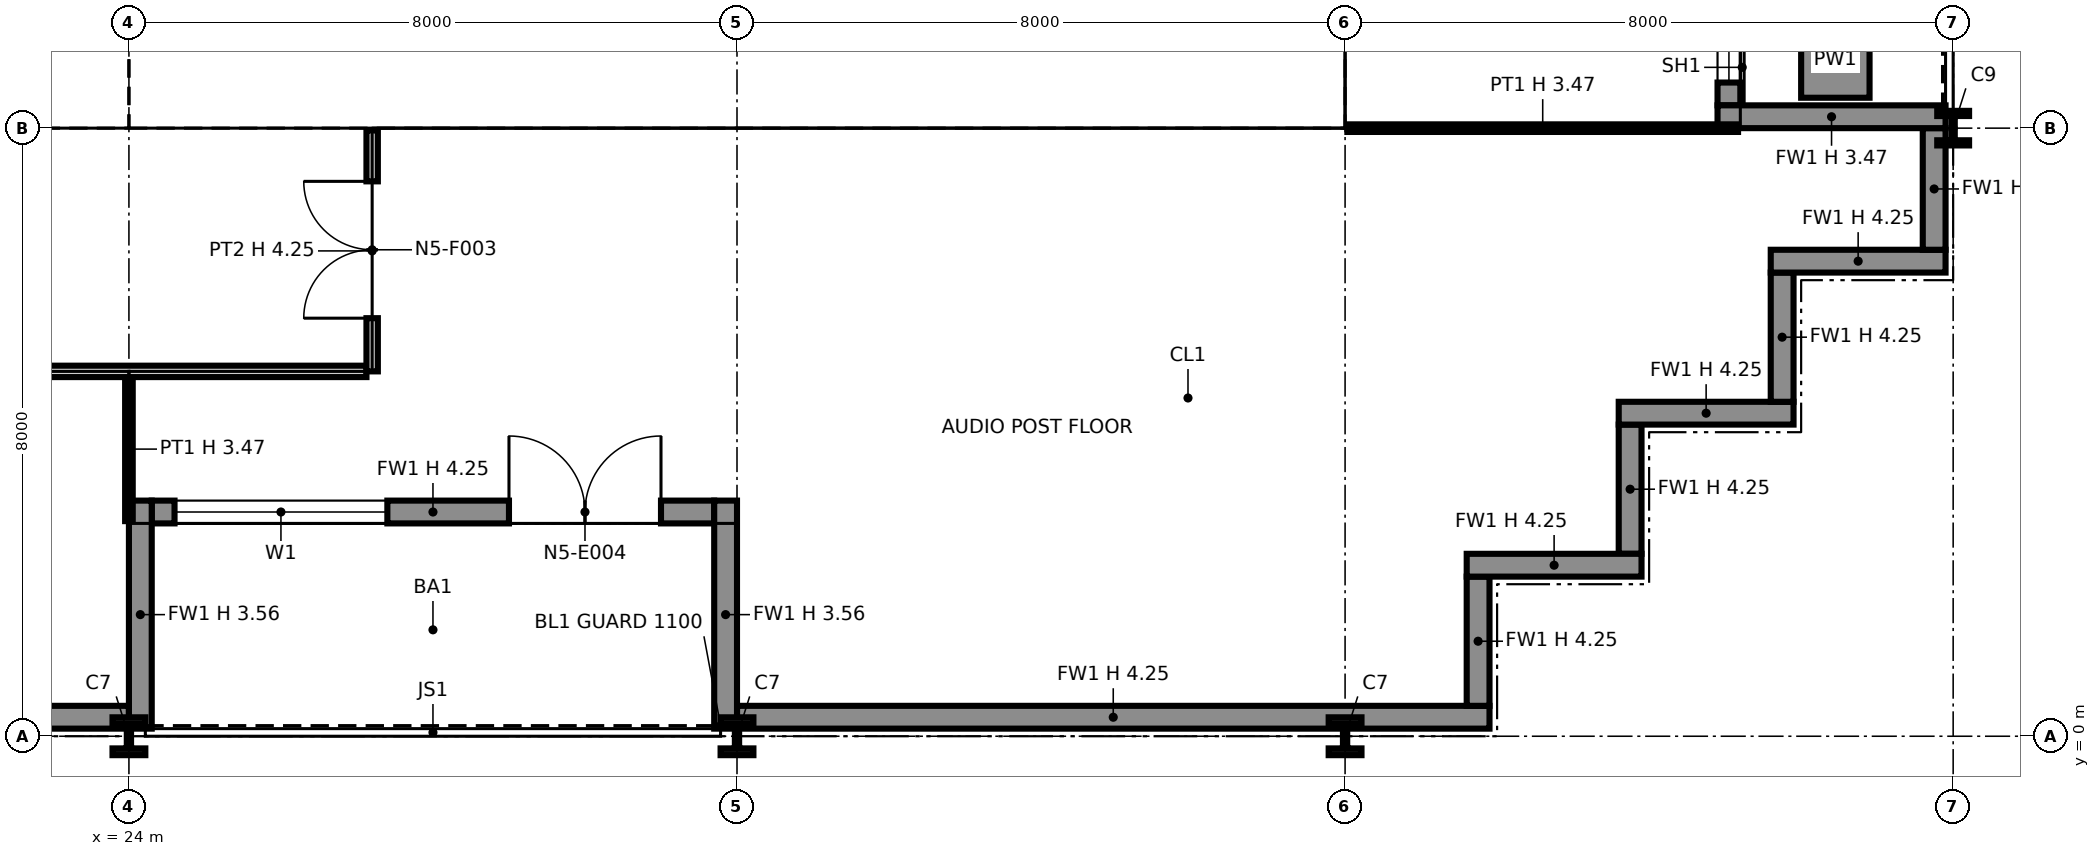
"""IFC4 building model, lengths in metres.
Left out: names, types, materials, properties, quantities, classifications, styles, units other than length and angle.
Written with IfcOpenShell. Run it as: python <this file> out.ifc"""

import sys

from ifc_helpers import new_model, si_unit, direction, frame, frame_2d, origin, origin_2d, place, context, subcontext, project, spatial, polyline, rectangle, i_section, outline, extrude, element, fill, save


model = new_model("IFC4")
c1 = context("Model", 3, precision=1e-05, world=origin(), true_north=direction((0.0, 1.0)))
c2 = subcontext(c1, "Body", "Model", "MODEL_VIEW")
j1 = project(units=[si_unit("LENGTHUNIT", "METRE"), si_unit("PLANEANGLEUNIT", "RADIAN")], contexts=[c1])
p1 = place(None, origin())
s1 = spatial("IfcSite", under=j1, at=p1, CompositionType="ELEMENT")
p2 = place(p1, origin())
s2 = spatial("IfcBuilding", under=s1, at=p2, CompositionType="ELEMENT")
p3 = place(p2, frame((0.0, 0.0, 87.6)))
s3 = spatial("IfcBuildingStorey", under=s2, at=p3, CompositionType="ELEMENT", Elevation=87.6)
p4 = place(p3, frame((24.0, 0.0, 0.0), z_axis=(0.0, 0.0, 1.0), x_axis=(1.0, 0.0, 0.0)))
e1 = element("IfcColumn", 1, at=p4, inside=s3, PredefinedType="COLUMN", context=c2, shape_type="SweptSolid", body=[
    extrude(i_section(OverallWidth=0.432, OverallDepth=0.498, WebThickness=0.056, FlangeThickness=0.089, at=origin_2d()), origin(), (0.0, 0.0, 1.0), 4.25),
])
p5 = place(p3, frame((24.0, 8.0, 0.0), z_axis=(0.0, 0.0, 1.0), x_axis=(1.0, 0.0, 0.0)))
e2 = element("IfcColumn", 2, at=p5, inside=s3, PredefinedType="COLUMN", context=c2, shape_type="SweptSolid", body=[
    extrude(i_section(OverallWidth=0.411, OverallDepth=0.434, WebThickness=0.036, FlangeThickness=0.057, at=origin_2d()), origin(), (0.0, 0.0, 1.0), 4.25),
])
p6 = place(p3, frame((32.0, 0.0, 0.0), z_axis=(0.0, 0.0, 1.0), x_axis=(1.0, 0.0, 0.0)))
e3 = element("IfcColumn", 3, at=p6, inside=s3, PredefinedType="COLUMN", context=c2, shape_type="SweptSolid", body=[
    extrude(i_section(OverallWidth=0.432, OverallDepth=0.498, WebThickness=0.056, FlangeThickness=0.089, at=origin_2d()), origin(), (0.0, 0.0, 1.0), 4.25),
])
p7 = place(p3, frame((32.0, 8.0, 0.0), z_axis=(0.0, 0.0, 1.0), x_axis=(1.0, 0.0, 0.0)))
e4 = element("IfcColumn", 4, at=p7, inside=s3, PredefinedType="COLUMN", context=c2, shape_type="SweptSolid", body=[
    extrude(i_section(OverallWidth=0.406, OverallDepth=0.417, WebThickness=0.03, FlangeThickness=0.048, at=origin_2d()), origin(), (0.0, 0.0, 1.0), 4.25),
])
p8 = place(p3, frame((40.0, 0.0, 0.0), z_axis=(0.0, 0.0, 1.0), x_axis=(1.0, 0.0, 0.0)))
e5 = element("IfcColumn", 5, at=p8, inside=s3, PredefinedType="COLUMN", context=c2, shape_type="SweptSolid", body=[
    extrude(i_section(OverallWidth=0.432, OverallDepth=0.498, WebThickness=0.056, FlangeThickness=0.089, at=origin_2d()), origin(), (0.0, 0.0, 1.0), 4.25),
])
p9 = place(p3, frame((40.0, 8.0, 0.0), z_axis=(0.0, 0.0, 1.0), x_axis=(1.0, 0.0, 0.0)))
e6 = element("IfcColumn", 6, at=p9, inside=s3, PredefinedType="COLUMN", context=c2, shape_type="SweptSolid", body=[
    extrude(i_section(OverallWidth=0.406, OverallDepth=0.417, WebThickness=0.03, FlangeThickness=0.048, at=origin_2d()), origin(), (0.0, 0.0, 1.0), 4.25),
])
p10 = place(p3, frame((48.0, 8.0, 0.0), z_axis=(0.0, 0.0, 1.0), x_axis=(1.0, 0.0, 0.0)))
e7 = element("IfcColumn", 7, at=p10, inside=s3, PredefinedType="COLUMN", context=c2, shape_type="SweptSolid", body=[
    extrude(i_section(OverallWidth=0.419, OverallDepth=0.455, WebThickness=0.042, FlangeThickness=0.068, at=origin_2d()), origin(), (0.0, 0.0, 1.0), 4.25),
])
p11 = place(p3, frame((16.0, 0.25, 0.0), z_axis=(0.0, 0.0, 1.0), x_axis=(1.0, 0.0, 0.0)))
e8 = element("IfcWall", 8, at=p11, inside=s3, PredefinedType="SOLIDWALL", context=c2, shape_type="SweptSolid", body=[
    extrude(rectangle(XDim=8.0, YDim=0.3, at=frame_2d((4.0, 0.0))), origin(), (0.0, 0.0, 1.0), 4.25),
])
p12 = place(p3, frame((24.3, 2.95, 0.0), z_axis=(0.0, 0.0, 1.0), x_axis=(1.0, 0.0, 0.0)))
e9 = element("IfcWall", 9, at=p12, inside=s3, PredefinedType="SOLIDWALL", context=c2, shape_type="SweptSolid", body=[
    extrude(rectangle(XDim=7.4, YDim=0.3, at=frame_2d((3.7, 0.0))), origin(), (0.0, 0.0, 1.0), 4.25),
])
p13 = place(p12, frame((0.3, 0.0, 0.9)))
e10 = element("IfcOpeningElement", 10, at=p13, cuts=e9, PredefinedType="OPENING", context=c2, shape_type="SweptSolid", body=[
    extrude(rectangle(XDim=2.8, YDim=2.2, at=frame_2d((1.4, 1.1))), frame((0.0, 0.16, 0.0), z_axis=(0.0, -1.0, 0.0), x_axis=(1.0, 0.0, 0.0)), (0.0, 0.0, 1.0), 0.32),
])
p14 = place(p12, frame((4.7, 0.0, 0.0)))
e11 = element("IfcOpeningElement", 11, at=p14, cuts=e9, PredefinedType="OPENING", context=c2, shape_type="SweptSolid", body=[
    extrude(rectangle(XDim=2.0, YDim=2.4, at=frame_2d((1.0, 1.2))), frame((0.0, 0.16, 0.0), z_axis=(0.0, -1.0, 0.0), x_axis=(1.0, 0.0, 0.0)), (0.0, 0.0, 1.0), 0.32),
])
for number, where, z_axis, x_axis in (
    (12, (24.15, 0.1, 0.0), (0.0, 0.0, 1.0), (0.0, 1.0, 0.0)),
    (13, (31.85, 0.1, 0.0), (0.0, 0.0, 1.0), (0.0, 1.0, 0.0)),
):
    element("IfcWall", number, at=place(p3, frame(where, z_axis=z_axis, x_axis=x_axis)), inside=s3, PredefinedType="SOLIDWALL", context=c2, shape_type="SweptSolid", body=[
        extrude(rectangle(XDim=3.0, YDim=0.3, at=frame_2d((1.5, 0.0))), origin(), (0.0, 0.0, 1.0), 3.556),
    ])
p15 = place(p3, frame((32.0, 0.25, 0.0), z_axis=(0.0, 0.0, 1.0), x_axis=(1.0, 0.0, 0.0)))
e14 = element("IfcWall", 14, at=p15, inside=s3, PredefinedType="SOLIDWALL", context=c2, shape_type="SweptSolid", body=[
    extrude(rectangle(XDim=9.9, YDim=0.3, at=frame_2d((4.95, 0.0))), origin(), (0.0, 0.0, 1.0), 4.25),
])
p16 = place(p3, frame((41.75, 0.4, 0.0), z_axis=(0.0, 0.0, 1.0), x_axis=(0.0, 1.0, 0.0)))
e15 = element("IfcWall", 15, at=p16, inside=s3, PredefinedType="SOLIDWALL", context=c2, shape_type="SweptSolid", body=[
    extrude(rectangle(XDim=1.7, YDim=0.3, at=frame_2d((0.85, 0.0))), origin(), (0.0, 0.0, 1.0), 4.25),
])
p17 = place(p3, frame((41.6, 2.25, 0.0), z_axis=(0.0, 0.0, 1.0), x_axis=(1.0, 0.0, 0.0)))
e16 = element("IfcWall", 16, at=p17, inside=s3, PredefinedType="SOLIDWALL", context=c2, shape_type="SweptSolid", body=[
    extrude(rectangle(XDim=2.3, YDim=0.3, at=frame_2d((1.15, 0.0))), origin(), (0.0, 0.0, 1.0), 4.25),
])
p18 = place(p3, frame((43.75, 2.4, 0.0), z_axis=(0.0, 0.0, 1.0), x_axis=(0.0, 1.0, 0.0)))
e17 = element("IfcWall", 17, at=p18, inside=s3, PredefinedType="SOLIDWALL", context=c2, shape_type="SweptSolid", body=[
    extrude(rectangle(XDim=1.7, YDim=0.3, at=frame_2d((0.85, 0.0))), origin(), (0.0, 0.0, 1.0), 4.25),
])
p19 = place(p3, frame((43.6, 4.25, 0.0), z_axis=(0.0, 0.0, 1.0), x_axis=(1.0, 0.0, 0.0)))
e18 = element("IfcWall", 18, at=p19, inside=s3, PredefinedType="SOLIDWALL", context=c2, shape_type="SweptSolid", body=[
    extrude(rectangle(XDim=2.3, YDim=0.3, at=frame_2d((1.15, 0.0))), origin(), (0.0, 0.0, 1.0), 4.25),
])
p20 = place(p3, frame((45.75, 4.4, 0.0), z_axis=(0.0, 0.0, 1.0), x_axis=(0.0, 1.0, 0.0)))
e19 = element("IfcWall", 19, at=p20, inside=s3, PredefinedType="SOLIDWALL", context=c2, shape_type="SweptSolid", body=[
    extrude(rectangle(XDim=1.7, YDim=0.3, at=frame_2d((0.85, 0.0))), origin(), (0.0, 0.0, 1.0), 4.25),
])
p21 = place(p3, frame((45.6, 6.25, 0.0), z_axis=(0.0, 0.0, 1.0), x_axis=(1.0, 0.0, 0.0)))
e20 = element("IfcWall", 20, at=p21, inside=s3, PredefinedType="SOLIDWALL", context=c2, shape_type="SweptSolid", body=[
    extrude(rectangle(XDim=2.3, YDim=0.3, at=frame_2d((1.15, 0.0))), origin(), (0.0, 0.0, 1.0), 4.25),
])
p22 = place(p3, frame((47.75, 6.4, 0.0), z_axis=(0.0, 0.0, 1.0), x_axis=(0.0, 1.0, 0.0)))
e21 = element("IfcWall", 21, at=p22, inside=s3, PredefinedType="SOLIDWALL", context=c2, shape_type="SweptSolid", body=[
    extrude(rectangle(XDim=1.6, YDim=0.3, at=frame_2d((0.8, 0.0))), origin(), (0.0, 0.0, 1.0), 4.25),
])
p23 = place(p3, frame((45.05, 8.3, 0.0), z_axis=(0.0, 0.0, 1.0), x_axis=(0.0, 1.0, 0.0)))
e22 = element("IfcWall", 22, at=p23, inside=s3, PredefinedType="SOLIDWALL", context=c2, shape_type="SweptSolid", body=[
    extrude(rectangle(XDim=7.4, YDim=0.3, at=frame_2d((3.7, 0.0))), origin(), (0.0, 0.0, 1.0), 4.25),
])
p24 = place(p23, frame((0.3, 0.0, 0.9)))
e23 = element("IfcOpeningElement", 23, at=p24, cuts=e22, PredefinedType="OPENING", context=c2, shape_type="SweptSolid", body=[
    extrude(rectangle(XDim=2.8, YDim=2.2, at=frame_2d((1.4, 1.1))), frame((0.0, 0.16, 0.0), z_axis=(0.0, -1.0, 0.0), x_axis=(1.0, 0.0, 0.0)), (0.0, 0.0, 1.0), 0.32),
])
p25 = place(p23, frame((4.7, 0.0, 0.0)))
e24 = element("IfcOpeningElement", 24, at=p25, cuts=e22, PredefinedType="OPENING", context=c2, shape_type="SweptSolid", body=[
    extrude(rectangle(XDim=2.0, YDim=2.4, at=frame_2d((1.0, 1.2))), frame((0.0, 0.16, 0.0), z_axis=(0.0, -1.0, 0.0), x_axis=(1.0, 0.0, 0.0)), (0.0, 0.0, 1.0), 0.32),
])
p26 = place(p3, frame((47.9, 8.15, 0.0), z_axis=(0.0, 0.0, 1.0), x_axis=(-1.0, 0.0, 0.0)))
e25 = element("IfcWall", 25, at=p26, inside=s3, PredefinedType="SOLIDWALL", context=c2, shape_type="SweptSolid", body=[
    extrude(rectangle(XDim=3.0, YDim=0.3, at=frame_2d((1.5, 0.0))), origin(), (0.0, 0.0, 1.0), 3.469),
])
p27 = place(p3, frame((46.45, 8.4, 0.0), z_axis=(0.0, 0.0, 1.0), x_axis=(0.0, 1.0, 0.0)))
e26 = element("IfcWall", 26, at=p27, inside=s3, PredefinedType="SOLIDWALL", context=c2, shape_type="SweptSolid", body=[
    extrude(rectangle(XDim=3.2, YDim=0.9, at=frame_2d((1.6, 0.0))), origin(), (0.0, 0.0, 1.0), 0.6),
])
p28 = place(p3, frame((8.65, 8.75, 0.0), z_axis=(0.0, 0.0, 1.0), x_axis=(1.0, 0.0, 0.0)))
e27 = element("IfcWall", 27, at=p28, inside=s3, PredefinedType="PARTITIONING", context=c2, shape_type="SweptSolid", body=[
    extrude(outline(polyline([(0.0, 0.0), (14.7, 0.0), (14.7, 4.25), (7.469, 4.25), (7.469, 3.632), (7.231, 3.632), (7.23, 4.25), (0.0, 4.25), (0.0, 0.0)])), frame((0.0, 0.1, 0.0), z_axis=(0.0, -1.0, 0.0), x_axis=(1.0, 0.0, 0.0)), (0.0, 0.0, 1.0), 0.2),
])
p29 = place(p28, frame((1.3, 0.0, 0.0)))
e28 = element("IfcOpeningElement", 28, at=p29, cuts=e27, PredefinedType="OPENING", context=c2, shape_type="SweptSolid", body=[
    extrude(rectangle(XDim=1.4, YDim=2.1, at=frame_2d((0.7, 1.05))), frame((0.0, 0.11, 0.0), z_axis=(0.0, -1.0, 0.0), x_axis=(1.0, 0.0, 0.0)), (0.0, 0.0, 1.0), 0.22),
])
p30 = place(p28, frame((4.6, 0.0, 0.0)))
e29 = element("IfcOpeningElement", 29, at=p30, cuts=e27, PredefinedType="OPENING", context=c2, shape_type="SweptSolid", body=[
    extrude(rectangle(XDim=1.4, YDim=2.1, at=frame_2d((0.7, 1.05))), frame((0.0, 0.11, 0.0), z_axis=(0.0, -1.0, 0.0), x_axis=(1.0, 0.0, 0.0)), (0.0, 0.0, 1.0), 0.22),
])
p31 = place(p28, frame((10.4, 0.0, 0.0)))
e30 = element("IfcOpeningElement", 30, at=p31, cuts=e27, PredefinedType="OPENING", context=c2, shape_type="SweptSolid", body=[
    extrude(rectangle(XDim=1.2, YDim=2.1, at=frame_2d((0.6, 1.05))), frame((0.0, 0.11, 0.0), z_axis=(0.0, -1.0, 0.0), x_axis=(1.0, 0.0, 0.0)), (0.0, 0.0, 1.0), 0.22),
])
p32 = place(p3, frame((23.25, 8.85, 0.0), z_axis=(0.0, 0.0, 1.0), x_axis=(0.0, 1.0, 0.0)))
e31 = element("IfcWall", 31, at=p32, inside=s3, PredefinedType="PARTITIONING", context=c2, shape_type="SweptSolid", body=[
    extrude(outline(polyline([(0.0, 0.0), (14.3, 0.0), (14.3, 4.25), (11.231, 4.25), (11.23, 3.789), (11.07, 3.789), (11.069, 4.25), (7.27, 4.25), (7.269, 3.632), (7.031, 3.632), (7.031, 4.25), (1.231, 4.25), (1.23, 3.789), (1.07, 3.789), (1.069, 4.25), (0.0, 4.25), (0.0, 0.0)])), frame((0.0, 0.1, 0.0), z_axis=(0.0, -1.0, 0.0), x_axis=(1.0, 0.0, 0.0)), (0.0, 0.0, 1.0), 0.2),
])
p33 = place(p32, frame((8.3, 0.0, 0.0)))
e32 = element("IfcOpeningElement", 32, at=p33, cuts=e31, PredefinedType="OPENING", context=c2, shape_type="SweptSolid", body=[
    extrude(rectangle(XDim=1.8, YDim=2.1, at=frame_2d((0.9, 1.05))), frame((0.0, 0.11, 0.0), z_axis=(0.0, -1.0, 0.0), x_axis=(1.0, 0.0, 0.0)), (0.0, 0.0, 1.0), 0.22),
])
p34 = place(p3, frame((24.65, 8.75, 0.0), z_axis=(0.0, 0.0, 1.0), x_axis=(1.0, 0.0, 0.0)))
e33 = element("IfcWall", 33, at=p34, inside=s3, PredefinedType="PARTITIONING", context=c2, shape_type="SweptSolid", body=[
    extrude(outline(polyline([(0.0, 0.0), (14.7, 0.0), (14.7, 4.25), (7.469, 4.25), (7.469, 3.632), (7.231, 3.632), (7.23, 4.25), (0.0, 4.25), (0.0, 0.0)])), frame((0.0, 0.1, 0.0), z_axis=(0.0, -1.0, 0.0), x_axis=(1.0, 0.0, 0.0)), (0.0, 0.0, 1.0), 0.2),
])
p35 = place(p3, frame((24.75, 8.85, 0.0), z_axis=(0.0, 0.0, 1.0), x_axis=(0.0, 1.0, 0.0)))
e34 = element("IfcWall", 34, at=p35, inside=s3, PredefinedType="PARTITIONING", context=c2, shape_type="SweptSolid", body=[
    extrude(outline(polyline([(0.0, 0.0), (6.3, 0.0), (6.3, 4.25), (3.231, 4.25), (3.23, 3.789), (3.07, 3.789), (3.069, 4.25), (0.0, 4.25), (0.0, 0.0)])), frame((0.0, 0.1, 0.0), z_axis=(0.0, -1.0, 0.0), x_axis=(1.0, 0.0, 0.0)), (0.0, 0.0, 1.0), 0.2),
])
for number, where, z_axis, x_axis in (
    (35, (26.675, 8.85, 0.0), (0.0, 0.0, 1.0), (0.0, 1.0, 0.0)),
    (36, (28.425, 8.85, 0.0), (0.0, 0.0, 1.0), (0.0, 1.0, 0.0)),
    (37, (30.275, 8.85, 0.0), (0.0, 0.0, 1.0), (0.0, 1.0, 0.0)),
):
    element("IfcWall", number, at=place(p3, frame(where, z_axis=z_axis, x_axis=x_axis)), inside=s3, PredefinedType="PARTITIONING", context=c2, shape_type="SweptSolid", body=[
        extrude(outline(polyline([(0.0, 0.0), (4.2, 0.0), (4.2, 4.25), (3.231, 4.25), (3.23, 3.789), (3.07, 3.789), (3.069, 4.25), (0.0, 4.25), (0.0, 0.0)])), frame((0.0, 0.075, 0.0), z_axis=(0.0, -1.0, 0.0), x_axis=(1.0, 0.0, 0.0)), (0.0, 0.0, 1.0), 0.15),
    ])
p36 = place(p3, frame((32.0, 8.85, 0.0), z_axis=(0.0, 0.0, 1.0), x_axis=(0.0, 1.0, 0.0)))
e38 = element("IfcWall", 38, at=p36, inside=s3, PredefinedType="PARTITIONING", context=c2, shape_type="SweptSolid", body=[
    extrude(rectangle(XDim=4.2, YDim=0.6, at=frame_2d((2.1, 0.0))), origin(), (0.0, 0.0, 1.0), 3.632),
])
for number, where, z_axis, x_axis in (
    (39, (35.6, 8.85, 0.0), (0.0, 0.0, 1.0), (0.0, 1.0, 0.0)),
    (40, (39.25, 8.85, 0.0), (0.0, 0.0, 1.0), (0.0, 1.0, 0.0)),
):
    element("IfcWall", number, at=place(p3, frame(where, z_axis=z_axis, x_axis=x_axis)), inside=s3, PredefinedType="PARTITIONING", context=c2, shape_type="SweptSolid", body=[
        extrude(rectangle(XDim=6.3, YDim=0.2, at=frame_2d((3.15, 0.0))), origin(), (0.0, 0.0, 1.0), 4.25),
    ])
p37 = place(p3, frame((24.0, 2.83, 0.0), z_axis=(0.0, 0.0, 1.0), x_axis=(0.0, 1.0, 0.0)))
e41 = element("IfcWall", 41, at=p37, inside=s3, PredefinedType="PARTITIONING", context=c2, shape_type="SweptSolid", body=[
    extrude(rectangle(XDim=1.895, YDim=0.1, at=frame_2d((0.948, 0.0))), origin(), (0.0, 0.0, 1.0), 3.47),
])
p38 = place(p3, frame((4.875, 4.8, 0.0), z_axis=(0.0, 0.0, 1.0), x_axis=(1.0, 0.0, 0.0)))
e42 = element("IfcWall", 42, at=p38, inside=s3, PredefinedType="PARTITIONING", context=c2, shape_type="SweptSolid", body=[
    extrude(rectangle(XDim=22.25, YDim=0.15, at=frame_2d((11.125, 0.0))), origin(), (0.0, 0.0, 1.0), 4.25),
])
p39 = place(p38, frame((13.625, 0.0, 0.0), z_axis=(0.0, 0.0, 1.0), x_axis=(-1.0, 0.0, 0.0)))
e43 = element("IfcOpeningElement", 43, at=p39, cuts=e42, PredefinedType="OPENING", context=c2, shape_type="SweptSolid", body=[
    extrude(rectangle(XDim=1.0, YDim=2.1, at=frame_2d((0.5, 1.05))), frame((0.0, 0.085, 0.0), z_axis=(0.0, -1.0, 0.0), x_axis=(1.0, 0.0, 0.0)), (0.0, 0.0, 1.0), 0.17),
])
p40 = place(p38, frame((17.625, 0.0, 0.0), z_axis=(0.0, 0.0, 1.0), x_axis=(-1.0, 0.0, 0.0)))
e44 = element("IfcOpeningElement", 44, at=p40, cuts=e42, PredefinedType="OPENING", context=c2, shape_type="SweptSolid", body=[
    extrude(rectangle(XDim=1.0, YDim=2.1, at=frame_2d((0.5, 1.05))), frame((0.0, 0.085, 0.0), z_axis=(0.0, -1.0, 0.0), x_axis=(1.0, 0.0, 0.0)), (0.0, 0.0, 1.0), 0.17),
])
p41 = place(p38, frame((7.625, 0.0, 0.0), z_axis=(0.0, 0.0, 1.0), x_axis=(-1.0, 0.0, 0.0)))
e45 = element("IfcOpeningElement", 45, at=p41, cuts=e42, PredefinedType="OPENING", context=c2, shape_type="SweptSolid", body=[
    extrude(rectangle(XDim=1.0, YDim=2.1, at=frame_2d((0.5, 1.05))), frame((0.0, 0.085, 0.0), z_axis=(0.0, -1.0, 0.0), x_axis=(1.0, 0.0, 0.0)), (0.0, 0.0, 1.0), 0.17),
])
p42 = place(p3, frame((27.2, 4.8, 0.0), z_axis=(0.0, 0.0, 1.0), x_axis=(0.0, 1.0, 0.0)))
e46 = element("IfcWall", 46, at=p42, inside=s3, PredefinedType="PARTITIONING", context=c2, shape_type="SweptSolid", body=[
    extrude(rectangle(XDim=3.17, YDim=0.15, at=frame_2d((1.585, 0.0))), origin(), (0.0, 0.0, 1.0), 4.25),
])
p43 = place(p42, frame((0.7, 0.0, 0.0)))
e47 = element("IfcOpeningElement", 47, at=p43, cuts=e46, PredefinedType="OPENING", context=c2, shape_type="SweptSolid", body=[
    extrude(rectangle(XDim=1.8, YDim=2.1, at=frame_2d((0.9, 1.05))), frame((0.0, 0.085, 0.0), z_axis=(0.0, -1.0, 0.0), x_axis=(1.0, 0.0, 0.0)), (0.0, 0.0, 1.0), 0.17),
])
p44 = place(p3, frame((40.03, 8.0, 0.0), z_axis=(0.0, 0.0, 1.0), x_axis=(1.0, 0.0, 0.0)))
e48 = element("IfcWall", 48, at=p44, inside=s3, PredefinedType="PARTITIONING", context=c2, shape_type="SweptSolid", body=[
    extrude(rectangle(XDim=5.14, YDim=0.1, at=frame_2d((2.57, 0.0))), origin(), (0.0, 0.0, 1.0), 3.47),
])
p45 = place(p13, origin())
e49 = element("IfcWindow", 49, at=p45, inside=s3, PartitioningType="SINGLE_PANEL", PredefinedType="WINDOW", context=c2, shape_type="SweptSolid", body=[
    extrude(rectangle(XDim=2.8, YDim=2.2, at=frame_2d((1.4, 1.1))), frame((0.0, 0.03, 0.0), z_axis=(0.0, -1.0, 0.0), x_axis=(1.0, 0.0, 0.0)), (0.0, 0.0, 1.0), 0.06),
])
fill(e10, e49)
p46 = place(p14, origin())
e50 = element("IfcDoor", 50, at=p46, inside=s3, OperationType="DOUBLE_DOOR_SINGLE_SWING", PredefinedType="DOOR", context=c2, shape_type="SweptSolid", body=[
    extrude(rectangle(XDim=2.0, YDim=2.4, at=frame_2d((1.0, 1.2))), frame((0.0, 0.025, 0.0), z_axis=(0.0, -1.0, 0.0), x_axis=(1.0, 0.0, 0.0)), (0.0, 0.0, 1.0), 0.05),
])
fill(e11, e50)
p47 = place(p24, origin())
e51 = element("IfcWindow", 51, at=p47, inside=s3, PartitioningType="SINGLE_PANEL", PredefinedType="WINDOW", context=c2, shape_type="SweptSolid", body=[
    extrude(rectangle(XDim=2.8, YDim=2.2, at=frame_2d((1.4, 1.1))), frame((0.0, 0.03, 0.0), z_axis=(0.0, -1.0, 0.0), x_axis=(1.0, 0.0, 0.0)), (0.0, 0.0, 1.0), 0.06),
])
fill(e23, e51)
p48 = place(p43, origin())
e52 = element("IfcDoor", 52, at=p48, inside=s3, OperationType="DOUBLE_DOOR_SINGLE_SWING", PredefinedType="DOOR", context=c2, shape_type="SweptSolid", body=[
    extrude(rectangle(XDim=1.8, YDim=2.1, at=frame_2d((0.9, 1.05))), frame((0.0, 0.025, 0.0), z_axis=(0.0, -1.0, 0.0), x_axis=(1.0, 0.0, 0.0)), (0.0, 0.0, 1.0), 0.05),
])
fill(e47, e52)
save(model, sys.argv[1])
